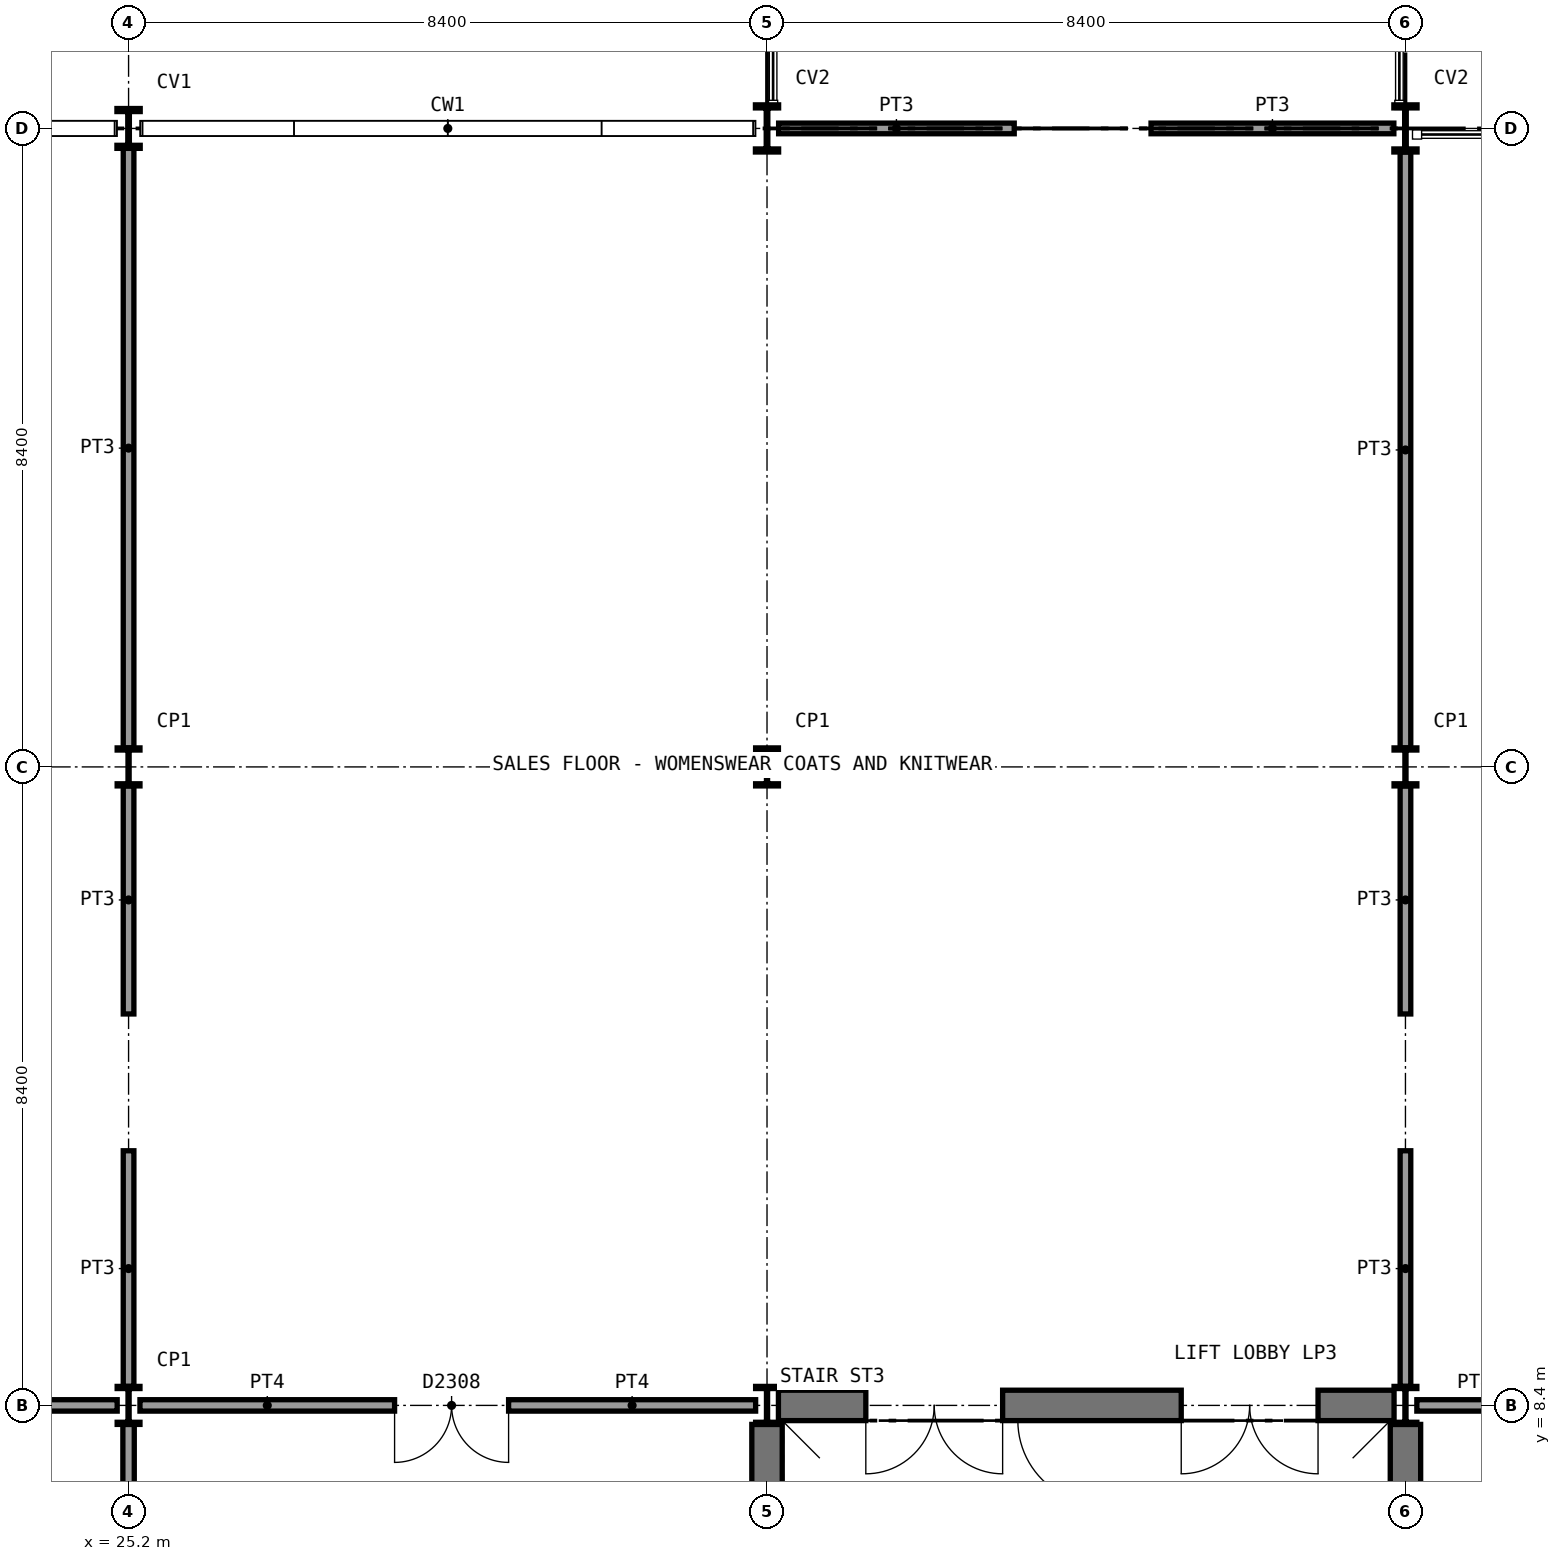
"""IFC4 building model, lengths in metres.
Left out: names, types, materials, properties, quantities, classifications, styles, units other than length and angle.
Written with IfcOpenShell. Run it as: python <this file> out.ifc"""

import sys

from ifc_helpers import new_model, si_unit, direction, frame, frame_2d, origin, origin_2d, place, context, subcontext, project, spatial, rectangle, i_section, extrude, element, fill, save


model = new_model("IFC4")
c1 = context("Model", 3, precision=1e-05, world=origin(), true_north=direction((0.0, 1.0)))
c2 = subcontext(c1, "Body", "Model", "MODEL_VIEW")
j1 = project(units=[si_unit("LENGTHUNIT", "METRE"), si_unit("PLANEANGLEUNIT", "RADIAN")], contexts=[c1])
p1 = place(None, origin())
s1 = spatial("IfcSite", under=j1, at=p1, CompositionType="ELEMENT")
p2 = place(p1, origin())
s2 = spatial("IfcBuilding", under=s1, at=p2, CompositionType="ELEMENT")
p3 = place(p2, frame((0.0, 0.0, 6.0)))
s3 = spatial("IfcBuildingStorey", under=s2, at=p3, CompositionType="ELEMENT", Elevation=6.0)
p4 = place(p3, frame((33.75, 8.4, 0.0), z_axis=(0.0, 0.0, 1.0), x_axis=(1.0, 0.0, 0.0)))
e1 = element("IfcWall", 1, at=p4, inside=s3, PredefinedType="SHEAR", context=c2, shape_type="SweptSolid", body=[
    extrude(rectangle(XDim=8.1, YDim=0.4, at=frame_2d((4.05, 0.0))), origin(), (0.0, 0.0, 1.0), 5.25),
])
p5 = place(p4, frame((1.15, 0.0, 0.0)))
e2 = element("IfcOpeningElement", 2, at=p5, cuts=e1, PredefinedType="OPENING", context=c2, shape_type="SweptSolid", body=[
    extrude(rectangle(XDim=1.8, YDim=2.1, at=frame_2d((0.9, 1.05))), frame((0.0, 0.21, 0.0), z_axis=(0.0, -1.0, 0.0), x_axis=(1.0, 0.0, 0.0)), (0.0, 0.0, 1.0), 0.42),
])
p6 = place(p4, frame((5.3, 0.0, 0.0)))
e3 = element("IfcOpeningElement", 3, at=p6, cuts=e1, PredefinedType="OPENING", context=c2, shape_type="SweptSolid", body=[
    extrude(rectangle(XDim=1.8, YDim=2.1, at=frame_2d((0.9, 1.05))), frame((0.0, 0.21, 0.0), z_axis=(0.0, -1.0, 0.0), x_axis=(1.0, 0.0, 0.0)), (0.0, 0.0, 1.0), 0.42),
])
for number, where, z_axis, x_axis in (
    (4, (33.6, 0.25, 0.0), (0.0, 0.0, 1.0), (0.0, 1.0, 0.0)),
    (5, (42.0, 0.25, 0.0), (0.0, 0.0, 1.0), (0.0, 1.0, 0.0)),
):
    element("IfcWall", number, at=place(p3, frame(where, z_axis=z_axis, x_axis=x_axis)), inside=s3, PredefinedType="SHEAR", context=c2, shape_type="SweptSolid", body=[
        extrude(rectangle(XDim=7.9, YDim=0.4, at=frame_2d((3.95, 0.0))), origin(), (0.0, 0.0, 1.0), 5.25),
    ])
for number, where, z_axis, x_axis in (
    (6, (25.2, 8.4, 0.0), (0.0, 0.0, 1.0), (1.0, 0.0, 0.0)),
    (7, (25.2, 16.8, 0.0), (0.0, 0.0, 1.0), (1.0, 0.0, 0.0)),
):
    element("IfcColumn", number, at=place(p3, frame(where, z_axis=z_axis, x_axis=x_axis)), inside=s3, PredefinedType="COLUMN", context=c2, shape_type="SweptSolid", body=[
        extrude(i_section(OverallWidth=0.3, OverallDepth=0.5, WebThickness=0.014, FlangeThickness=0.028, FilletRadius=0.027, at=origin_2d()), origin(), (0.0, 0.0, 1.0), 5.4),
    ])
p7 = place(p3, frame((25.2, 25.2, 0.0), z_axis=(0.0, 0.0, 1.0), x_axis=(1.0, 0.0, 0.0)))
e8 = element("IfcColumn", 8, at=p7, inside=s3, PredefinedType="COLUMN", context=c2, shape_type="SweptSolid", body=[
    extrude(i_section(OverallWidth=0.306, OverallDepth=0.524, WebThickness=0.021, FlangeThickness=0.04, FilletRadius=0.027, at=origin_2d()), origin(), (0.0, 0.0, 1.0), 5.4),
])
for number, where, z_axis, x_axis in (
    (9, (33.6, 8.4, 0.0), (0.0, 0.0, 1.0), (1.0, 0.0, 0.0)),
    (10, (33.6, 16.8, 0.0), (0.0, 0.0, 1.0), (1.0, 0.0, 0.0)),
):
    element("IfcColumn", number, at=place(p3, frame(where, z_axis=z_axis, x_axis=x_axis)), inside=s3, PredefinedType="COLUMN", context=c2, shape_type="SweptSolid", body=[
        extrude(i_section(OverallWidth=0.3, OverallDepth=0.5, WebThickness=0.014, FlangeThickness=0.028, FilletRadius=0.027, at=origin_2d()), origin(), (0.0, 0.0, 1.0), 5.4),
    ])
p8 = place(p3, frame((33.6, 25.2, 0.0), z_axis=(0.0, 0.0, 1.0), x_axis=(1.0, 0.0, 0.0)))
e11 = element("IfcColumn", 11, at=p8, inside=s3, PredefinedType="COLUMN", context=c2, shape_type="SweptSolid", body=[
    extrude(i_section(OverallWidth=0.305, OverallDepth=0.62, WebThickness=0.021, FlangeThickness=0.04, FilletRadius=0.027, at=origin_2d()), origin(), (0.0, 0.0, 1.0), 5.4),
])
for number, where, z_axis, x_axis in (
    (12, (42.0, 8.4, 0.0), (0.0, 0.0, 1.0), (1.0, 0.0, 0.0)),
    (13, (42.0, 16.8, 0.0), (0.0, 0.0, 1.0), (1.0, 0.0, 0.0)),
):
    element("IfcColumn", number, at=place(p3, frame(where, z_axis=z_axis, x_axis=x_axis)), inside=s3, PredefinedType="COLUMN", context=c2, shape_type="SweptSolid", body=[
        extrude(i_section(OverallWidth=0.3, OverallDepth=0.5, WebThickness=0.014, FlangeThickness=0.028, FilletRadius=0.027, at=origin_2d()), origin(), (0.0, 0.0, 1.0), 5.4),
    ])
p9 = place(p3, frame((42.0, 25.2, 0.0), z_axis=(0.0, 0.0, 1.0), x_axis=(1.0, 0.0, 0.0)))
e14 = element("IfcColumn", 14, at=p9, inside=s3, PredefinedType="COLUMN", context=c2, shape_type="SweptSolid", body=[
    extrude(i_section(OverallWidth=0.305, OverallDepth=0.62, WebThickness=0.021, FlangeThickness=0.04, FilletRadius=0.027, at=origin_2d()), origin(), (0.0, 0.0, 1.0), 5.4),
])
p10 = place(p3, frame((25.2, 0.25, 0.0), z_axis=(0.0, 0.0, 1.0), x_axis=(0.0, 1.0, 0.0)))
e15 = element("IfcWall", 15, at=p10, inside=s3, PredefinedType="SOLIDWALL", context=c2, shape_type="SweptSolid", body=[
    extrude(rectangle(XDim=7.9, YDim=0.15, at=frame_2d((3.95, 0.0))), origin(), (0.0, 0.0, 1.0), 4.81),
])
p11 = place(p3, frame((16.95, 8.4, 0.0), z_axis=(0.0, 0.0, 1.0), x_axis=(1.0, 0.0, 0.0)))
e16 = element("IfcWall", 16, at=p11, inside=s3, PredefinedType="SOLIDWALL", context=c2, shape_type="SweptSolid", body=[
    extrude(rectangle(XDim=8.1, YDim=0.15, at=frame_2d((4.05, 0.0))), origin(), (0.0, 0.0, 1.0), 4.92),
])
p12 = place(p11, frame((3.6, 0.0, 0.0)))
e17 = element("IfcOpeningElement", 17, at=p12, cuts=e16, PredefinedType="OPENING", context=c2, shape_type="SweptSolid", body=[
    extrude(rectangle(XDim=0.8, YDim=2.1, at=frame_2d((0.4, 1.05))), frame((0.0, 0.085, 0.0), z_axis=(0.0, -1.0, 0.0), x_axis=(1.0, 0.0, 0.0)), (0.0, 0.0, 1.0), 0.17),
])
p13 = place(p3, frame((25.35, 8.4, 0.0), z_axis=(0.0, 0.0, 1.0), x_axis=(1.0, 0.0, 0.0)))
e18 = element("IfcWall", 18, at=p13, inside=s3, PredefinedType="SOLIDWALL", context=c2, shape_type="SweptSolid", body=[
    extrude(rectangle(XDim=8.1, YDim=0.15, at=frame_2d((4.05, 0.0))), origin(), (0.0, 0.0, 1.0), 4.92),
])
p14 = place(p13, frame((3.35, 0.0, 0.0)))
e19 = element("IfcOpeningElement", 19, at=p14, cuts=e18, PredefinedType="OPENING", context=c2, shape_type="SweptSolid", body=[
    extrude(rectangle(XDim=1.5, YDim=2.1, at=frame_2d((0.75, 1.05))), frame((0.0, 0.085, 0.0), z_axis=(0.0, -1.0, 0.0), x_axis=(1.0, 0.0, 0.0)), (0.0, 0.0, 1.0), 0.17),
])
p15 = place(p3, frame((42.15, 8.4, 0.0), z_axis=(0.0, 0.0, 1.0), x_axis=(1.0, 0.0, 0.0)))
e20 = element("IfcWall", 20, at=p15, inside=s3, PredefinedType="SOLIDWALL", context=c2, shape_type="SweptSolid", body=[
    extrude(rectangle(XDim=8.1, YDim=0.15, at=frame_2d((4.05, 0.0))), origin(), (0.0, 0.0, 1.0), 4.81),
])
p16 = place(p15, frame((3.35, 0.0, 0.0)))
e21 = element("IfcOpeningElement", 21, at=p16, cuts=e20, PredefinedType="OPENING", context=c2, shape_type="SweptSolid", body=[
    extrude(rectangle(XDim=1.5, YDim=2.1, at=frame_2d((0.75, 1.05))), frame((0.0, 0.085, 0.0), z_axis=(0.0, -1.0, 0.0), x_axis=(1.0, 0.0, 0.0)), (0.0, 0.0, 1.0), 0.17),
])
p17 = place(p3, frame((25.2, 8.65, 0.0), z_axis=(0.0, 0.0, 1.0), x_axis=(0.0, 1.0, 0.0)))
e22 = element("IfcWall", 22, at=p17, inside=s3, PredefinedType="PARTITIONING", context=c2, shape_type="SweptSolid", body=[
    extrude(rectangle(XDim=3.1, YDim=0.14, at=frame_2d((1.55, 0.0))), origin(), (0.0, 0.0, 1.0), 4.81),
])
p18 = place(p3, frame((25.2, 13.55, 0.0), z_axis=(0.0, 0.0, 1.0), x_axis=(0.0, 1.0, 0.0)))
e23 = element("IfcWall", 23, at=p18, inside=s3, PredefinedType="PARTITIONING", context=c2, shape_type="SweptSolid", body=[
    extrude(rectangle(XDim=3.0, YDim=0.14, at=frame_2d((1.5, 0.0))), origin(), (0.0, 0.0, 1.0), 4.81),
])
p19 = place(p3, frame((25.2, 17.05, 0.0), z_axis=(0.0, 0.0, 1.0), x_axis=(0.0, 1.0, 0.0)))
e24 = element("IfcWall", 24, at=p19, inside=s3, PredefinedType="PARTITIONING", context=c2, shape_type="SweptSolid", body=[
    extrude(rectangle(XDim=7.888, YDim=0.14, at=frame_2d((3.944, 0.0))), origin(), (0.0, 0.0, 1.0), 4.81),
])
p20 = place(p3, frame((42.0, 8.65, 0.0), z_axis=(0.0, 0.0, 1.0), x_axis=(0.0, 1.0, 0.0)))
e25 = element("IfcWall", 25, at=p20, inside=s3, PredefinedType="PARTITIONING", context=c2, shape_type="SweptSolid", body=[
    extrude(rectangle(XDim=3.1, YDim=0.14, at=frame_2d((1.55, 0.0))), origin(), (0.0, 0.0, 1.0), 4.81),
])
p21 = place(p3, frame((42.0, 13.55, 0.0), z_axis=(0.0, 0.0, 1.0), x_axis=(0.0, 1.0, 0.0)))
e26 = element("IfcWall", 26, at=p21, inside=s3, PredefinedType="PARTITIONING", context=c2, shape_type="SweptSolid", body=[
    extrude(rectangle(XDim=3.0, YDim=0.14, at=frame_2d((1.5, 0.0))), origin(), (0.0, 0.0, 1.0), 4.81),
])
p22 = place(p3, frame((42.0, 17.05, 0.0), z_axis=(0.0, 0.0, 1.0), x_axis=(0.0, 1.0, 0.0)))
e27 = element("IfcWall", 27, at=p22, inside=s3, PredefinedType="PARTITIONING", context=c2, shape_type="SweptSolid", body=[
    extrude(rectangle(XDim=7.84, YDim=0.14, at=frame_2d((3.92, 0.0))), origin(), (0.0, 0.0, 1.0), 4.81),
])
p23 = place(p3, frame((33.753, 25.2, 0.0), z_axis=(0.0, 0.0, 1.0), x_axis=(1.0, 0.0, 0.0)))
e28 = element("IfcWall", 28, at=p23, inside=s3, PredefinedType="PARTITIONING", context=c2, shape_type="SweptSolid", body=[
    extrude(rectangle(XDim=3.1, YDim=0.14, at=frame_2d((1.55, 0.0))), origin(), (0.0, 0.0, 1.0), 4.81),
])
p24 = place(p3, frame((38.653, 25.2, 0.0), z_axis=(0.0, 0.0, 1.0), x_axis=(1.0, 0.0, 0.0)))
e29 = element("IfcWall", 29, at=p24, inside=s3, PredefinedType="PARTITIONING", context=c2, shape_type="SweptSolid", body=[
    extrude(rectangle(XDim=3.195, YDim=0.14, at=frame_2d((1.597, 0.0))), origin(), (0.0, 0.0, 1.0), 4.81),
])
p25 = place(p3, frame((38.0, 0.2, 0.0), z_axis=(0.0, 0.0, 1.0), x_axis=(0.0, 1.0, 0.0)))
e30 = element("IfcWall", 30, at=p25, inside=s3, PredefinedType="SHEAR", context=c2, shape_type="SweptSolid", body=[
    extrude(rectangle(XDim=8.0, YDim=0.2, at=frame_2d((4.0, 0.0))), origin(), (0.0, 0.0, 1.0), 5.25),
])
p26 = place(p25, frame((6.9, 0.0, 0.0)))
e31 = element("IfcOpeningElement", 31, at=p26, cuts=e30, PredefinedType="OPENING", context=c2, shape_type="SweptSolid", body=[
    extrude(rectangle(XDim=1.11, YDim=2.1, at=frame_2d((0.555, 1.05))), frame((0.0, 0.11, 0.0), z_axis=(0.0, -1.0, 0.0), x_axis=(1.0, 0.0, 0.0)), (0.0, 0.0, 1.0), 0.22),
])
p27 = place(p14, frame((1.5, 0.0, 0.0), z_axis=(0.0, 0.0, 1.0), x_axis=(-1.0, 0.0, 0.0)))
e32 = element("IfcDoor", 32, at=p27, inside=s3, OperationType="DOUBLE_DOOR_SINGLE_SWING", PredefinedType="DOOR", context=c2, shape_type="SweptSolid", body=[
    extrude(rectangle(XDim=1.5, YDim=2.1, at=frame_2d((0.75, 1.05))), frame((0.0, 0.025, 0.0), z_axis=(0.0, -1.0, 0.0), x_axis=(1.0, 0.0, 0.0)), (0.0, 0.0, 1.0), 0.05),
])
fill(e19, e32)
p28 = place(p26, origin())
e33 = element("IfcDoor", 33, at=p28, inside=s3, OperationType="SINGLE_SWING_RIGHT", PredefinedType="DOOR", context=c2, shape_type="SweptSolid", body=[
    extrude(rectangle(XDim=1.1, YDim=2.1, at=frame_2d((0.55, 1.05))), frame((0.0, 0.025, 0.0), z_axis=(0.0, -1.0, 0.0), x_axis=(1.0, 0.0, 0.0)), (0.0, 0.0, 1.0), 0.05),
])
fill(e31, e33)
p29 = place(p5, frame((1.8, 0.0, 0.0), z_axis=(0.0, 0.0, 1.0), x_axis=(-1.0, 0.0, 0.0)))
e34 = element("IfcDoor", 34, at=p29, inside=s3, OperationType="DOUBLE_DOOR_SINGLE_SWING", PredefinedType="DOOR", context=c2, shape_type="SweptSolid", body=[
    extrude(rectangle(XDim=1.8, YDim=2.1, at=frame_2d((0.9, 1.05))), frame((0.0, 0.025, 0.0), z_axis=(0.0, -1.0, 0.0), x_axis=(1.0, 0.0, 0.0)), (0.0, 0.0, 1.0), 0.05),
])
fill(e2, e34)
p30 = place(p6, frame((1.8, 0.0, 0.0), z_axis=(0.0, 0.0, 1.0), x_axis=(-1.0, 0.0, 0.0)))
e35 = element("IfcDoor", 35, at=p30, inside=s3, OperationType="DOUBLE_DOOR_SINGLE_SWING", PredefinedType="DOOR", context=c2, shape_type="SweptSolid", body=[
    extrude(rectangle(XDim=1.8, YDim=2.1, at=frame_2d((0.9, 1.05))), frame((0.0, 0.025, 0.0), z_axis=(0.0, -1.0, 0.0), x_axis=(1.0, 0.0, 0.0)), (0.0, 0.0, 1.0), 0.05),
])
fill(e3, e35)
save(model, sys.argv[1])
